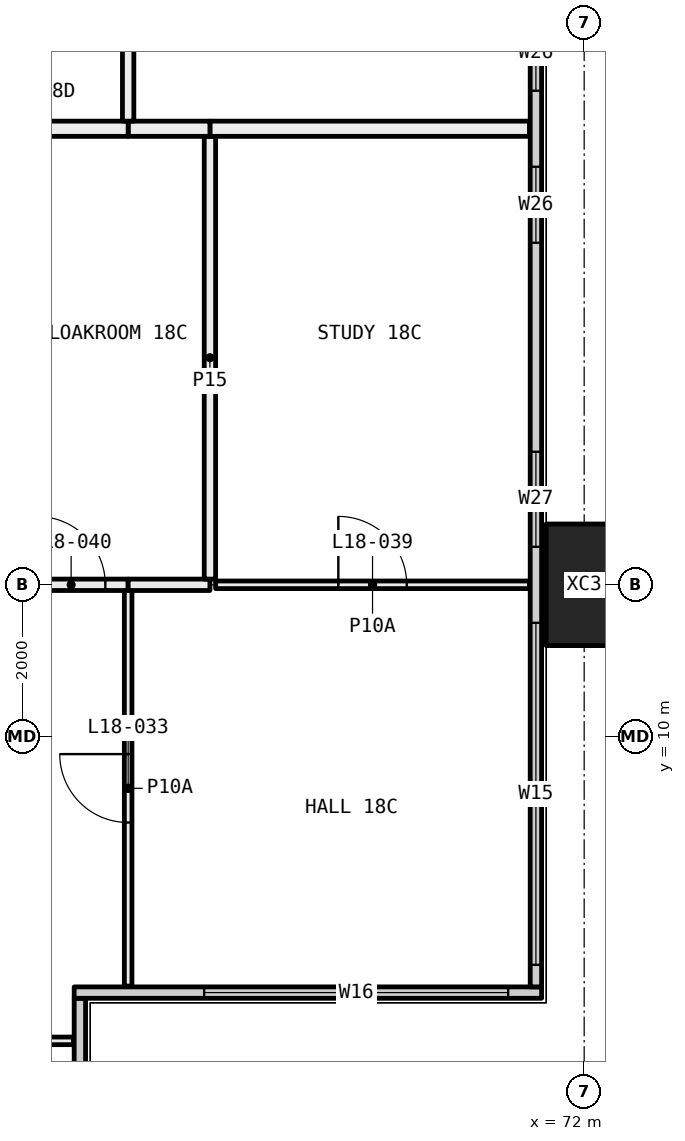
"""IFC4 building model, lengths in metres.
Left out: names, types, materials, properties, quantities, classifications, styles, units other than length and angle.
Written with IfcOpenShell. Run it as: python <this file> out.ifc"""

import sys

from ifc_helpers import new_model, si_unit, direction, frame, frame_2d, origin, origin_2d, place, context, subcontext, project, spatial, rectangle, hollow_rectangle, extrude, element, fill, save


model = new_model("IFC4")
c1 = context("Model", 3, precision=1e-05, world=origin(), true_north=direction((0.0, 1.0)))
c2 = subcontext(c1, "Body", "Model", "MODEL_VIEW")
j1 = project(units=[si_unit("LENGTHUNIT", "METRE"), si_unit("PLANEANGLEUNIT", "RADIAN")], contexts=[c1])
p1 = place(None, origin())
s1 = spatial("IfcSite", under=j1, at=p1, CompositionType="ELEMENT")
p2 = place(p1, origin())
s2 = spatial("IfcBuilding", under=s1, at=p2, CompositionType="ELEMENT")
p3 = place(p2, frame((0.0, 0.0, 74.85)))
s3 = spatial("IfcBuildingStorey", under=s2, at=p3, CompositionType="ELEMENT", Elevation=74.85)
p4 = place(p3, frame((72.0, 12.0, -0.4), z_axis=(0.0, 0.0, 1.0), x_axis=(0.0, 1.0, 0.0)))
e1 = element("IfcColumn", 1, at=p4, inside=s3, PredefinedType="COLUMN", context=c2, shape_type="SweptSolid", body=[
    extrude(hollow_rectangle(XDim=1.6, YDim=1.0, WallThickness=0.065, at=origin_2d()), origin(), (0.0, 0.0, 1.0), 3.45),
])
p5 = place(p3, frame((65.365, 0.71, 0.0), z_axis=(0.0, 0.0, 1.0), x_axis=(0.0, 1.0, 0.0)))
e2 = element("IfcWall", 2, at=p5, inside=s3, PredefinedType="ELEMENTEDWALL", context=c2, shape_type="SweptSolid", body=[
    extrude(rectangle(XDim=5.85, YDim=0.15, at=frame_2d((2.925, 0.0))), origin(), (0.0, 0.0, 1.0), 3.05),
])
p6 = place(p5, frame((0.29, 0.0, 0.45)))
e3 = element("IfcOpeningElement", 3, at=p6, cuts=e2, PredefinedType="OPENING", context=c2, shape_type="SweptSolid", body=[
    extrude(rectangle(XDim=4.0, YDim=2.55, at=frame_2d((2.0, 1.275))), frame((0.0, 0.085, 0.0), z_axis=(0.0, -1.0, 0.0), x_axis=(1.0, 0.0, 0.0)), (0.0, 0.0, 1.0), 0.17),
])
p7 = place(p3, frame((65.29, 6.635, 0.0), z_axis=(0.0, 0.0, 1.0), x_axis=(1.0, 0.0, 0.0)))
e4 = element("IfcWall", 4, at=p7, inside=s3, PredefinedType="ELEMENTEDWALL", context=c2, shape_type="SweptSolid", body=[
    extrude(rectangle(XDim=6.15, YDim=0.15, at=frame_2d((3.075, 0.0))), origin(), (0.0, 0.0, 1.0), 3.05),
])
p8 = place(p7, frame((1.71, 0.0, 0.45)))
e5 = element("IfcOpeningElement", 5, at=p8, cuts=e4, PredefinedType="OPENING", context=c2, shape_type="SweptSolid", body=[
    extrude(rectangle(XDim=4.0, YDim=2.55, at=frame_2d((2.0, 1.275))), frame((0.0, 0.085, 0.0), z_axis=(0.0, -1.0, 0.0), x_axis=(1.0, 0.0, 0.0)), (0.0, 0.0, 1.0), 0.17),
])
p9 = place(p3, frame((71.365, 6.71, 0.0), z_axis=(0.0, 0.0, 1.0), x_axis=(0.0, 1.0, 0.0)))
e6 = element("IfcWall", 6, at=p9, inside=s3, PredefinedType="ELEMENTEDWALL", context=c2, shape_type="SweptSolid", body=[
    extrude(rectangle(XDim=34.58, YDim=0.15, at=frame_2d((17.29, 0.0))), origin(), (0.0, 0.0, 1.0), 3.05),
])
p10 = place(p9, frame((0.29, 0.0, 0.45)))
e7 = element("IfcOpeningElement", 7, at=p10, cuts=e6, PredefinedType="OPENING", context=c2, shape_type="SweptSolid", body=[
    extrude(rectangle(XDim=4.5, YDim=2.55, at=frame_2d((2.25, 1.275))), frame((0.0, 0.085, 0.0), z_axis=(0.0, -1.0, 0.0), x_axis=(1.0, 0.0, 0.0)), (0.0, 0.0, 1.0), 0.17),
])
p11 = place(p9, frame((5.79, 0.0, 0.45)))
e8 = element("IfcOpeningElement", 8, at=p11, cuts=e6, PredefinedType="OPENING", context=c2, shape_type="SweptSolid", body=[
    extrude(rectangle(XDim=1.25, YDim=2.55, at=frame_2d((0.625, 1.275))), frame((0.0, 0.085, 0.0), z_axis=(0.0, -1.0, 0.0), x_axis=(1.0, 0.0, 0.0)), (0.0, 0.0, 1.0), 0.17),
])
p12 = place(p9, frame((9.79, 0.0, 0.45)))
e9 = element("IfcOpeningElement", 9, at=p12, cuts=e6, PredefinedType="OPENING", context=c2, shape_type="SweptSolid", body=[
    extrude(rectangle(XDim=1.0, YDim=2.55, at=frame_2d((0.5, 1.275))), frame((0.0, 0.085, 0.0), z_axis=(0.0, -1.0, 0.0), x_axis=(1.0, 0.0, 0.0)), (0.0, 0.0, 1.0), 0.17),
])
p13 = place(p9, frame((11.79, 0.0, 0.45)))
e10 = element("IfcOpeningElement", 10, at=p13, cuts=e6, PredefinedType="OPENING", context=c2, shape_type="SweptSolid", body=[
    extrude(rectangle(XDim=1.0, YDim=2.55, at=frame_2d((0.5, 1.275))), frame((0.0, 0.085, 0.0), z_axis=(0.0, -1.0, 0.0), x_axis=(1.0, 0.0, 0.0)), (0.0, 0.0, 1.0), 0.17),
])
p14 = place(p9, frame((15.54, 0.0, 0.45)))
e11 = element("IfcOpeningElement", 11, at=p14, cuts=e6, PredefinedType="OPENING", context=c2, shape_type="SweptSolid", body=[
    extrude(rectangle(XDim=1.25, YDim=2.55, at=frame_2d((0.625, 1.275))), frame((0.0, 0.085, 0.0), z_axis=(0.0, -1.0, 0.0), x_axis=(1.0, 0.0, 0.0)), (0.0, 0.0, 1.0), 0.17),
])
p15 = place(p9, frame((17.79, 0.0, 0.45)))
e12 = element("IfcOpeningElement", 12, at=p15, cuts=e6, PredefinedType="OPENING", context=c2, shape_type="SweptSolid", body=[
    extrude(rectangle(XDim=1.25, YDim=2.55, at=frame_2d((0.625, 1.275))), frame((0.0, 0.085, 0.0), z_axis=(0.0, -1.0, 0.0), x_axis=(1.0, 0.0, 0.0)), (0.0, 0.0, 1.0), 0.17),
])
p16 = place(p9, frame((21.79, 0.0, 0.45)))
e13 = element("IfcOpeningElement", 13, at=p16, cuts=e6, PredefinedType="OPENING", context=c2, shape_type="SweptSolid", body=[
    extrude(rectangle(XDim=1.0, YDim=2.55, at=frame_2d((0.5, 1.275))), frame((0.0, 0.085, 0.0), z_axis=(0.0, -1.0, 0.0), x_axis=(1.0, 0.0, 0.0)), (0.0, 0.0, 1.0), 0.17),
])
p17 = place(p9, frame((23.79, 0.0, 0.45)))
e14 = element("IfcOpeningElement", 14, at=p17, cuts=e6, PredefinedType="OPENING", context=c2, shape_type="SweptSolid", body=[
    extrude(rectangle(XDim=1.0, YDim=2.55, at=frame_2d((0.5, 1.275))), frame((0.0, 0.085, 0.0), z_axis=(0.0, -1.0, 0.0), x_axis=(1.0, 0.0, 0.0)), (0.0, 0.0, 1.0), 0.17),
])
p18 = place(p9, frame((27.54, 0.0, 0.45)))
e15 = element("IfcOpeningElement", 15, at=p18, cuts=e6, PredefinedType="OPENING", context=c2, shape_type="SweptSolid", body=[
    extrude(rectangle(XDim=1.25, YDim=2.55, at=frame_2d((0.625, 1.275))), frame((0.0, 0.085, 0.0), z_axis=(0.0, -1.0, 0.0), x_axis=(1.0, 0.0, 0.0)), (0.0, 0.0, 1.0), 0.17),
])
p19 = place(p9, frame((29.79, 0.0, 0.45)))
e16 = element("IfcOpeningElement", 16, at=p19, cuts=e6, PredefinedType="OPENING", context=c2, shape_type="SweptSolid", body=[
    extrude(rectangle(XDim=4.5, YDim=2.55, at=frame_2d((2.25, 1.275))), frame((0.0, 0.085, 0.0), z_axis=(0.0, -1.0, 0.0), x_axis=(1.0, 0.0, 0.0)), (0.0, 0.0, 1.0), 0.17),
])
p20 = place(p3, frame((65.28, 6.0, 0.0), z_axis=(0.0, 0.0, 1.0), x_axis=(-1.0, 0.0, 0.0)))
e17 = element("IfcWall", 17, at=p20, inside=s3, PredefinedType="PARTITIONING", context=c2, shape_type="SweptSolid", body=[
    extrude(rectangle(XDim=5.23, YDim=0.1, at=frame_2d((2.615, 0.0))), origin(), (0.0, 0.0, 1.0), 2.45),
])
p21 = place(p3, frame((66.0, 6.72, 0.0), z_axis=(0.0, 0.0, 1.0), x_axis=(0.0, 1.0, 0.0)))
e18 = element("IfcWall", 18, at=p21, inside=s3, PredefinedType="PARTITIONING", context=c2, shape_type="SweptSolid", body=[
    extrude(rectangle(XDim=5.205, YDim=0.1, at=frame_2d((2.603, 0.0))), origin(), (0.0, 0.0, 1.0), 2.45),
])
p22 = place(p21, frame((2.153, 0.0, 0.0)))
e19 = element("IfcOpeningElement", 19, at=p22, cuts=e18, PredefinedType="OPENING", context=c2, shape_type="SweptSolid", body=[
    extrude(rectangle(XDim=0.9, YDim=2.1, at=frame_2d((0.45, 1.05))), frame((0.0, 0.06, 0.0), z_axis=(0.0, -1.0, 0.0), x_axis=(1.0, 0.0, 0.0)), (0.0, 0.0, 1.0), 0.12),
])
p23 = place(p3, frame((66.0, 12.0, 0.0), z_axis=(0.0, 0.0, 1.0), x_axis=(-1.0, 0.0, 0.0)))
e20 = element("IfcWall", 20, at=p23, inside=s3, PredefinedType="PARTITIONING", context=c2, shape_type="SweptSolid", body=[
    extrude(rectangle(XDim=1.5, YDim=0.15, at=frame_2d((0.75, 0.0))), origin(), (0.0, 0.0, 1.0), 2.45),
])
p24 = place(p23, frame((0.3, 0.0, 0.0)))
e21 = element("IfcOpeningElement", 21, at=p24, cuts=e20, PredefinedType="OPENING", context=c2, shape_type="SweptSolid", body=[
    extrude(rectangle(XDim=0.9, YDim=2.1, at=frame_2d((0.45, 1.05))), frame((0.0, 0.085, 0.0), z_axis=(0.0, -1.0, 0.0), x_axis=(1.0, 0.0, 0.0)), (0.0, 0.0, 1.0), 0.17),
])
p25 = place(p3, frame((71.28, 12.0, 0.0), z_axis=(0.0, 0.0, 1.0), x_axis=(-1.0, 0.0, 0.0)))
e22 = element("IfcWall", 22, at=p25, inside=s3, PredefinedType="PARTITIONING", context=c2, shape_type="SweptSolid", body=[
    extrude(rectangle(XDim=4.129, YDim=0.1, at=frame_2d((2.064, 0.0))), origin(), (0.0, 0.0, 1.0), 2.45),
])
p26 = place(p25, frame((1.615, 0.0, 0.0)))
e23 = element("IfcOpeningElement", 23, at=p26, cuts=e22, PredefinedType="OPENING", context=c2, shape_type="SweptSolid", body=[
    extrude(rectangle(XDim=0.9, YDim=2.1, at=frame_2d((0.45, 1.05))), frame((0.0, 0.06, 0.0), z_axis=(0.0, -1.0, 0.0), x_axis=(1.0, 0.0, 0.0)), (0.0, 0.0, 1.0), 0.12),
])
p27 = place(p3, frame((67.076, 12.0, 0.0), z_axis=(0.0, 0.0, 1.0), x_axis=(-1.0, 0.0, 0.0)))
e24 = element("IfcWall", 24, at=p27, inside=s3, PredefinedType="PARTITIONING", context=c2, shape_type="SweptSolid", body=[
    extrude(rectangle(XDim=1.076, YDim=0.15, at=frame_2d((0.538, 0.0))), origin(), (0.0, 0.0, 1.0), 2.45),
])
p28 = place(p3, frame((67.076, 17.9, 0.0), z_axis=(0.0, 0.0, 1.0), x_axis=(0.0, -1.0, 0.0)))
e25 = element("IfcWall", 25, at=p28, inside=s3, PredefinedType="PARTITIONING", context=c2, shape_type="SweptSolid", body=[
    extrude(rectangle(XDim=5.825, YDim=0.15, at=frame_2d((2.913, 0.0))), origin(), (0.0, 0.0, 1.0), 2.45),
])
p29 = place(p3, frame((71.28, 18.0, 0.0), z_axis=(0.0, 0.0, 1.0), x_axis=(-1.0, 0.0, 0.0)))
e26 = element("IfcWall", 26, at=p29, inside=s3, PredefinedType="PARTITIONING", context=c2, shape_type="SweptSolid", body=[
    extrude(rectangle(XDim=4.204, YDim=0.2, at=frame_2d((2.102, 0.0))), origin(), (0.0, 0.0, 1.0), 3.05),
])
p30 = place(p3, frame((67.076, 18.0, 0.0), z_axis=(0.0, 0.0, 1.0), x_axis=(-1.0, 0.0, 0.0)))
e27 = element("IfcWall", 27, at=p30, inside=s3, PredefinedType="PARTITIONING", context=c2, shape_type="SweptSolid", body=[
    extrude(rectangle(XDim=1.076, YDim=0.2, at=frame_2d((0.538, 0.0))), origin(), (0.0, 0.0, 1.0), 3.05),
])
p31 = place(p3, frame((66.0, 18.0, 0.0), z_axis=(0.0, 0.0, 1.0), x_axis=(-1.0, 0.0, 0.0)))
e28 = element("IfcWall", 28, at=p31, inside=s3, PredefinedType="PARTITIONING", context=c2, shape_type="SweptSolid", body=[
    extrude(rectangle(XDim=1.5, YDim=0.2, at=frame_2d((0.75, 0.0))), origin(), (0.0, 0.0, 1.0), 3.05),
])
p32 = place(p3, frame((66.0, 21.0, 0.0), z_axis=(0.0, 0.0, 1.0), x_axis=(0.0, -1.0, 0.0)))
e29 = element("IfcWall", 29, at=p32, inside=s3, PredefinedType="PARTITIONING", context=c2, shape_type="SweptSolid", body=[
    extrude(rectangle(XDim=2.9, YDim=0.15, at=frame_2d((1.45, 0.0))), origin(), (0.0, 0.0, 1.0), 3.05),
])
p33 = place(p32, frame((1.0, 0.0, 0.0)))
e30 = element("IfcOpeningElement", 30, at=p33, cuts=e29, PredefinedType="OPENING", context=c2, shape_type="SweptSolid", body=[
    extrude(rectangle(XDim=0.9, YDim=2.1, at=frame_2d((0.45, 1.05))), frame((0.0, 0.085, 0.0), z_axis=(0.0, -1.0, 0.0), x_axis=(1.0, 0.0, 0.0)), (0.0, 0.0, 1.0), 0.17),
])
p34 = place(p8, origin())
e31 = element("IfcWindow", 31, at=p34, inside=s3, PartitioningType="SINGLE_PANEL", PredefinedType="WINDOW", context=c2, shape_type="SweptSolid", body=[
    extrude(rectangle(XDim=4.0, YDim=2.55, at=frame_2d((2.0, 1.275))), frame((0.0, 0.03, 0.0), z_axis=(0.0, -1.0, 0.0), x_axis=(1.0, 0.0, 0.0)), (0.0, 0.0, 1.0), 0.06),
])
fill(e5, e31)
p35 = place(p10, origin())
e32 = element("IfcWindow", 32, at=p35, inside=s3, PartitioningType="SINGLE_PANEL", PredefinedType="WINDOW", context=c2, shape_type="SweptSolid", body=[
    extrude(rectangle(XDim=4.5, YDim=2.55, at=frame_2d((2.25, 1.275))), frame((0.0, 0.03, 0.0), z_axis=(0.0, -1.0, 0.0), x_axis=(1.0, 0.0, 0.0)), (0.0, 0.0, 1.0), 0.06),
])
fill(e7, e32)
p36 = place(p11, origin())
e33 = element("IfcWindow", 33, at=p36, inside=s3, PartitioningType="SINGLE_PANEL", PredefinedType="WINDOW", context=c2, shape_type="SweptSolid", body=[
    extrude(rectangle(XDim=1.25, YDim=2.55, at=frame_2d((0.625, 1.275))), frame((0.0, 0.03, 0.0), z_axis=(0.0, -1.0, 0.0), x_axis=(1.0, 0.0, 0.0)), (0.0, 0.0, 1.0), 0.06),
])
fill(e8, e33)
p37 = place(p12, origin())
e34 = element("IfcWindow", 34, at=p37, inside=s3, PartitioningType="SINGLE_PANEL", PredefinedType="WINDOW", context=c2, shape_type="SweptSolid", body=[
    extrude(rectangle(XDim=1.0, YDim=2.55, at=frame_2d((0.5, 1.275))), frame((0.0, 0.03, 0.0), z_axis=(0.0, -1.0, 0.0), x_axis=(1.0, 0.0, 0.0)), (0.0, 0.0, 1.0), 0.06),
])
fill(e9, e34)
p38 = place(p13, origin())
e35 = element("IfcWindow", 35, at=p38, inside=s3, PartitioningType="SINGLE_PANEL", PredefinedType="WINDOW", context=c2, shape_type="SweptSolid", body=[
    extrude(rectangle(XDim=1.0, YDim=2.55, at=frame_2d((0.5, 1.275))), frame((0.0, 0.03, 0.0), z_axis=(0.0, -1.0, 0.0), x_axis=(1.0, 0.0, 0.0)), (0.0, 0.0, 1.0), 0.06),
])
fill(e10, e35)
p39 = place(p22, origin())
e36 = element("IfcDoor", 36, at=p39, inside=s3, OperationType="SINGLE_SWING_LEFT", PredefinedType="DOOR", context=c2, shape_type="SweptSolid", body=[
    extrude(rectangle(XDim=0.9, YDim=2.1, at=frame_2d((0.45, 1.05))), frame((0.0, 0.025, 0.0), z_axis=(0.0, -1.0, 0.0), x_axis=(1.0, 0.0, 0.0)), (0.0, 0.0, 1.0), 0.05),
])
fill(e19, e36)
p40 = place(p26, frame((0.9, 0.0, 0.0), x_axis=(-1.0, 0.0, 0.0)))
e37 = element("IfcDoor", 37, at=p40, inside=s3, OperationType="SINGLE_SWING_RIGHT", PredefinedType="DOOR", context=c2, shape_type="SweptSolid", body=[
    extrude(rectangle(XDim=0.9, YDim=2.1, at=frame_2d((0.45, 1.05))), frame((0.0, 0.025, 0.0), z_axis=(0.0, -1.0, 0.0), x_axis=(1.0, 0.0, 0.0)), (0.0, 0.0, 1.0), 0.05),
])
fill(e23, e37)
p41 = place(p24, frame((0.9, 0.0, 0.0), x_axis=(-1.0, 0.0, 0.0)))
e38 = element("IfcDoor", 38, at=p41, inside=s3, OperationType="SINGLE_SWING_RIGHT", PredefinedType="DOOR", context=c2, shape_type="SweptSolid", body=[
    extrude(rectangle(XDim=0.9, YDim=2.1, at=frame_2d((0.45, 1.05))), frame((0.0, 0.025, 0.0), z_axis=(0.0, -1.0, 0.0), x_axis=(1.0, 0.0, 0.0)), (0.0, 0.0, 1.0), 0.05),
])
fill(e21, e38)
save(model, sys.argv[1])
